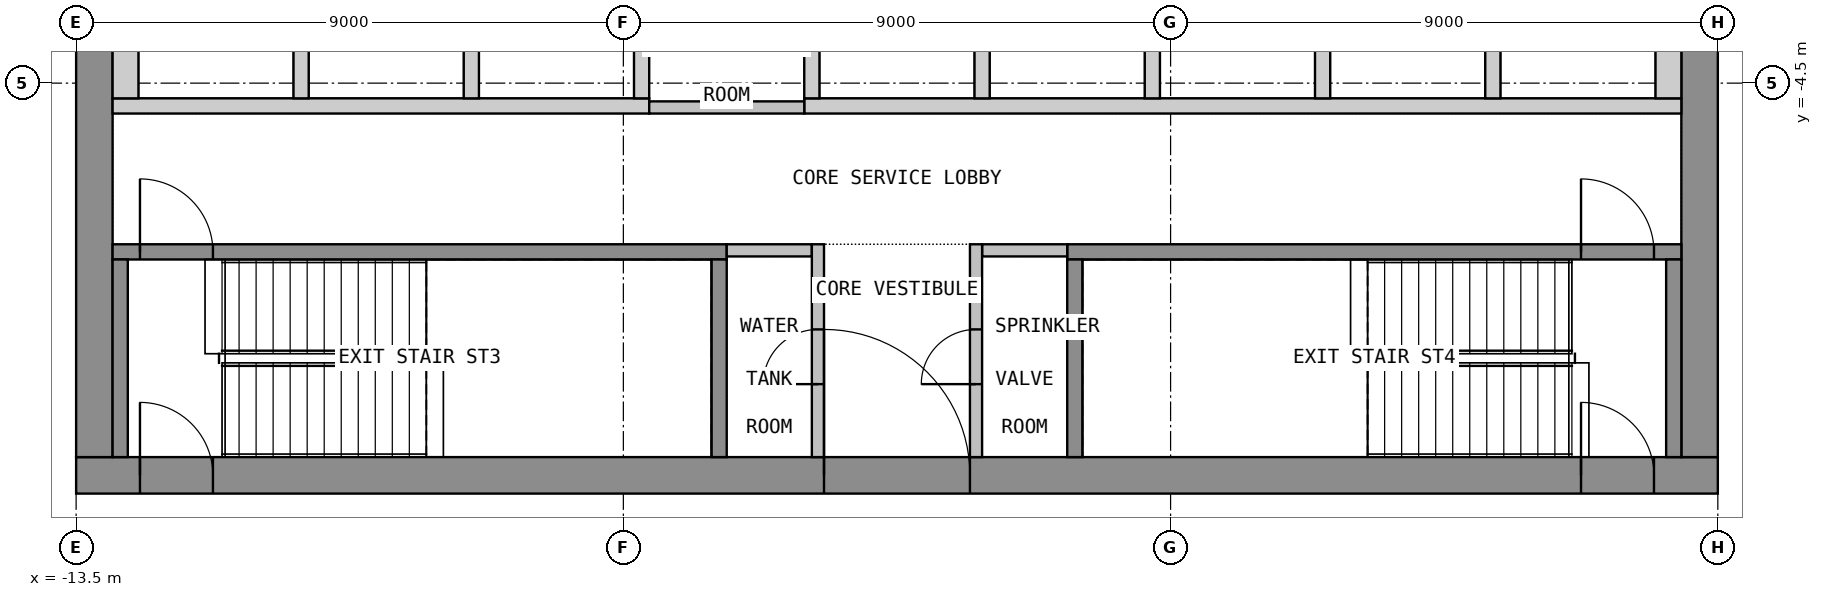
"""IFC4 building model, lengths in metres.
Left out: names, types, materials, properties, quantities, classifications, styles, units other than length and angle.
Written with IfcOpenShell. Run it as: python <this file> out.ifc"""

import sys

from ifc_helpers import new_model, si_unit, direction, frame, frame_2d, origin, place, context, subcontext, project, spatial, polyline, rectangle, outline, extrude, element, fill, save


model = new_model("IFC4")
c1 = context("Model", 3, precision=1e-05, world=origin(), true_north=direction((0.0, 1.0)))
c2 = subcontext(c1, "Body", "Model", "MODEL_VIEW")
j1 = project(units=[si_unit("LENGTHUNIT", "METRE"), si_unit("PLANEANGLEUNIT", "RADIAN")], contexts=[c1])
p1 = place(None, origin())
s1 = spatial("IfcSite", under=j1, at=p1, CompositionType="ELEMENT")
p2 = place(p1, origin())
s2 = spatial("IfcBuilding", under=s1, at=p2, CompositionType="ELEMENT")
p3 = place(p2, frame((0.0, 0.0, 179.4)))
s3 = spatial("IfcBuildingStorey", under=s2, at=p3, CompositionType="ELEMENT", Elevation=179.4)
p4 = place(p3, frame((-13.5, -10.95, 0.0), z_axis=(0.0, 0.0, 1.0), x_axis=(1.0, 0.0, 0.0)))
e1 = element("IfcWall", 1, at=p4, inside=s3, PredefinedType="SHEAR", context=c2, shape_type="SweptSolid", body=[
    extrude(rectangle(XDim=27.0, YDim=0.6, at=frame_2d((13.5, 0.0))), origin(), (0.0, 0.0, 1.0), 4.15),
])
p5 = place(p4, frame((12.3, 0.0, 0.0)))
e2 = element("IfcOpeningElement", 2, at=p5, cuts=e1, PredefinedType="OPENING", context=c2, shape_type="SweptSolid", body=[
    extrude(rectangle(XDim=2.4, YDim=2.1, at=frame_2d((1.2, 1.05))), frame((0.0, 0.31, 0.0), z_axis=(0.0, -1.0, 0.0), x_axis=(1.0, 0.0, 0.0)), (0.0, 0.0, 1.0), 0.62),
])
p6 = place(p4, frame((1.05, 0.0, 0.0)))
e3 = element("IfcOpeningElement", 3, at=p6, cuts=e1, PredefinedType="OPENING", context=c2, shape_type="SweptSolid", body=[
    extrude(rectangle(XDim=1.2, YDim=2.1, at=frame_2d((0.6, 1.05))), frame((0.0, 0.31, 0.0), z_axis=(0.0, -1.0, 0.0), x_axis=(1.0, 0.0, 0.0)), (0.0, 0.0, 1.0), 0.62),
])
p7 = place(p4, frame((24.75, 0.0, 0.0)))
e4 = element("IfcOpeningElement", 4, at=p7, cuts=e1, PredefinedType="OPENING", context=c2, shape_type="SweptSolid", body=[
    extrude(rectangle(XDim=1.2, YDim=2.1, at=frame_2d((0.6, 1.05))), frame((0.0, 0.31, 0.0), z_axis=(0.0, -1.0, 0.0), x_axis=(1.0, 0.0, 0.0)), (0.0, 0.0, 1.0), 0.62),
])
p8 = place(p3, frame((-13.2, -10.65, 0.0), z_axis=(0.0, 0.0, 1.0), x_axis=(0.0, 1.0, 0.0)))
e5 = element("IfcWall", 5, at=p8, inside=s3, PredefinedType="SHEAR", context=c2, shape_type="SweptSolid", body=[
    extrude(rectangle(XDim=21.3, YDim=0.6, at=frame_2d((10.65, 0.0))), origin(), (0.0, 0.0, 1.0), 4.15),
])
p9 = place(p8, frame((9.45, 0.0, 0.0)))
e6 = element("IfcOpeningElement", 6, at=p9, cuts=e5, PredefinedType="OPENING", context=c2, shape_type="SweptSolid", body=[
    extrude(rectangle(XDim=2.4, YDim=2.1, at=frame_2d((1.2, 1.05))), frame((0.0, 0.31, 0.0), z_axis=(0.0, -1.0, 0.0), x_axis=(1.0, 0.0, 0.0)), (0.0, 0.0, 1.0), 0.62),
])
p10 = place(p3, frame((13.2, -10.65, 0.0), z_axis=(0.0, 0.0, 1.0), x_axis=(0.0, 1.0, 0.0)))
e7 = element("IfcWall", 7, at=p10, inside=s3, PredefinedType="SHEAR", context=c2, shape_type="SweptSolid", body=[
    extrude(rectangle(XDim=21.3, YDim=0.6, at=frame_2d((10.65, 0.0))), origin(), (0.0, 0.0, 1.0), 4.15),
])
p11 = place(p10, frame((9.45, 0.0, 0.0)))
e8 = element("IfcOpeningElement", 8, at=p11, cuts=e7, PredefinedType="OPENING", context=c2, shape_type="SweptSolid", body=[
    extrude(rectangle(XDim=2.4, YDim=2.1, at=frame_2d((1.2, 1.05))), frame((0.0, 0.31, 0.0), z_axis=(0.0, -1.0, 0.0), x_axis=(1.0, 0.0, 0.0)), (0.0, 0.0, 1.0), 0.62),
])
p12 = place(p3, origin())
e9 = element("IfcWall", 9, at=p12, inside=s3, PredefinedType="SHEAR", context=c2, shape_type="SweptSolid", body=[
    extrude(outline(polyline([(-12.9, -5.0), (-4.075, -5.0), (-4.075, -4.75), (-12.9, -4.75), (-12.9, -5.0)])), origin(), (0.0, 0.0, 1.0), 4.15),
])
p13 = place(p3, origin())
e10 = element("IfcWall", 10, at=p13, inside=s3, PredefinedType="SHEAR", context=c2, shape_type="SweptSolid", body=[
    extrude(outline(polyline([(-1.525, -5.0), (12.9, -5.0), (12.9, -4.75), (-1.525, -4.75), (-1.525, -5.0)])), origin(), (0.0, 0.0, 1.0), 4.15),
])
p14 = place(p3, origin())
e11 = element("IfcWall", 11, at=p14, inside=s3, PredefinedType="SHEAR", context=c2, shape_type="SweptSolid", body=[
    extrude(outline(polyline([(-12.9, -4.75), (-12.475, -4.75), (-12.475, -3.05), (-12.9, -3.05), (-12.9, -4.75)])), origin(), (0.0, 0.0, 1.0), 4.15),
])
p15 = place(p3, origin())
e12 = element("IfcWall", 12, at=p15, inside=s3, PredefinedType="SHEAR", context=c2, shape_type="SweptSolid", body=[
    extrude(outline(polyline([(-9.925, -4.75), (-9.675, -4.75), (-9.675, -3.05), (-9.925, -3.05), (-9.925, -4.75)])), origin(), (0.0, 0.0, 1.0), 4.15),
])
p16 = place(p3, origin())
e13 = element("IfcWall", 13, at=p16, inside=s3, PredefinedType="SHEAR", context=c2, shape_type="SweptSolid", body=[
    extrude(outline(polyline([(-7.125, -4.75), (-6.875, -4.75), (-6.875, -3.05), (-7.125, -3.05), (-7.125, -4.75)])), origin(), (0.0, 0.0, 1.0), 4.15),
])
p17 = place(p3, origin())
e14 = element("IfcWall", 14, at=p17, inside=s3, PredefinedType="SHEAR", context=c2, shape_type="SweptSolid", body=[
    extrude(outline(polyline([(-4.325, -4.75), (-4.075, -4.75), (-4.075, -3.05), (-4.325, -3.05), (-4.325, -4.75)])), origin(), (0.0, 0.0, 1.0), 4.15),
])
p18 = place(p3, origin())
e15 = element("IfcWall", 15, at=p18, inside=s3, PredefinedType="SHEAR", context=c2, shape_type="SweptSolid", body=[
    extrude(outline(polyline([(-1.525, -4.75), (-1.275, -4.75), (-1.275, -2.05), (-1.525, -2.05), (-1.525, -4.75)])), origin(), (0.0, 0.0, 1.0), 4.15),
])
p19 = place(p3, origin())
e16 = element("IfcWall", 16, at=p19, inside=s3, PredefinedType="SHEAR", context=c2, shape_type="SweptSolid", body=[
    extrude(outline(polyline([(1.275, -4.75), (1.525, -4.75), (1.525, -2.05), (1.275, -2.05), (1.275, -4.75)])), origin(), (0.0, 0.0, 1.0), 4.15),
])
p20 = place(p3, origin())
e17 = element("IfcWall", 17, at=p20, inside=s3, PredefinedType="SHEAR", context=c2, shape_type="SweptSolid", body=[
    extrude(outline(polyline([(4.075, -4.75), (4.325, -4.75), (4.325, -2.05), (4.075, -2.05), (4.075, -4.75)])), origin(), (0.0, 0.0, 1.0), 4.15),
])
p21 = place(p3, origin())
e18 = element("IfcWall", 18, at=p21, inside=s3, PredefinedType="SHEAR", context=c2, shape_type="SweptSolid", body=[
    extrude(outline(polyline([(6.875, -4.75), (7.125, -4.75), (7.125, -2.05), (6.875, -2.05), (6.875, -4.75)])), origin(), (0.0, 0.0, 1.0), 4.15),
])
p22 = place(p3, origin())
e19 = element("IfcWall", 19, at=p22, inside=s3, PredefinedType="SHEAR", context=c2, shape_type="SweptSolid", body=[
    extrude(outline(polyline([(9.675, -4.75), (9.925, -4.75), (9.925, -2.05), (9.675, -2.05), (9.675, -4.75)])), origin(), (0.0, 0.0, 1.0), 4.15),
])
p23 = place(p3, origin())
e20 = element("IfcWall", 20, at=p23, inside=s3, PredefinedType="SHEAR", context=c2, shape_type="SweptSolid", body=[
    extrude(outline(polyline([(12.475, -4.75), (12.9, -4.75), (12.9, -2.05), (12.475, -2.05), (12.475, -4.75)])), origin(), (0.0, 0.0, 1.0), 4.15),
])
p24 = place(p3, frame((-12.9, -7.275, 0.0), z_axis=(0.0, 0.0, 1.0), x_axis=(1.0, 0.0, 0.0)))
e21 = element("IfcWall", 21, at=p24, inside=s3, PredefinedType="SHEAR", context=c2, shape_type="SweptSolid", body=[
    extrude(rectangle(XDim=10.1, YDim=0.25, at=frame_2d((5.05, 0.0))), origin(), (0.0, 0.0, 1.0), 4.15),
])
p25 = place(p24, frame((0.45, 0.0, 0.0)))
e22 = element("IfcOpeningElement", 22, at=p25, cuts=e21, PredefinedType="OPENING", context=c2, shape_type="SweptSolid", body=[
    extrude(rectangle(XDim=1.2, YDim=2.1, at=frame_2d((0.6, 1.05))), frame((0.0, 0.135, 0.0), z_axis=(0.0, -1.0, 0.0), x_axis=(1.0, 0.0, 0.0)), (0.0, 0.0, 1.0), 0.27),
])
for number, where, z_axis, x_axis in (
    (23, (-12.775, -10.65, 0.0), (0.0, 0.0, 1.0), (0.0, 1.0, 0.0)),
    (24, (-2.925, -10.65, 0.0), (0.0, 0.0, 1.0), (0.0, 1.0, 0.0)),
):
    element("IfcWall", number, at=place(p3, frame(where, z_axis=z_axis, x_axis=x_axis)), inside=s3, PredefinedType="SHEAR", context=c2, shape_type="SweptSolid", body=[
        extrude(rectangle(XDim=3.25, YDim=0.25, at=frame_2d((1.625, 0.0))), origin(), (0.0, 0.0, 1.0), 4.15),
    ])
p26 = place(p3, frame((2.8, -7.275, 0.0), z_axis=(0.0, 0.0, 1.0), x_axis=(1.0, 0.0, 0.0)))
e25 = element("IfcWall", 25, at=p26, inside=s3, PredefinedType="SHEAR", context=c2, shape_type="SweptSolid", body=[
    extrude(rectangle(XDim=10.1, YDim=0.25, at=frame_2d((5.05, 0.0))), origin(), (0.0, 0.0, 1.0), 4.15),
])
p27 = place(p26, frame((8.45, 0.0, 0.0)))
e26 = element("IfcOpeningElement", 26, at=p27, cuts=e25, PredefinedType="OPENING", context=c2, shape_type="SweptSolid", body=[
    extrude(rectangle(XDim=1.2, YDim=2.1, at=frame_2d((0.6, 1.05))), frame((0.0, 0.135, 0.0), z_axis=(0.0, -1.0, 0.0), x_axis=(1.0, 0.0, 0.0)), (0.0, 0.0, 1.0), 0.27),
])
for number, where, z_axis, x_axis in (
    (27, (2.925, -10.65, 0.0), (0.0, 0.0, 1.0), (0.0, 1.0, 0.0)),
    (28, (12.775, -10.65, 0.0), (0.0, 0.0, 1.0), (0.0, 1.0, 0.0)),
):
    element("IfcWall", number, at=place(p3, frame(where, z_axis=z_axis, x_axis=x_axis)), inside=s3, PredefinedType="SHEAR", context=c2, shape_type="SweptSolid", body=[
        extrude(rectangle(XDim=3.25, YDim=0.25, at=frame_2d((1.625, 0.0))), origin(), (0.0, 0.0, 1.0), 4.15),
    ])
for number, where, z_axis, x_axis in (
    (29, (-2.8, -7.25, 0.0), (0.0, 0.0, 1.0), (1.0, 0.0, 0.0)),
    (30, (1.4, -7.25, 0.0), (0.0, 0.0, 1.0), (1.0, 0.0, 0.0)),
):
    element("IfcWall", number, at=place(p3, frame(where, z_axis=z_axis, x_axis=x_axis)), inside=s3, PredefinedType="PARTITIONING", context=c2, shape_type="SweptSolid", body=[
        extrude(rectangle(XDim=1.4, YDim=0.2, at=frame_2d((0.7, 0.0))), origin(), (0.0, 0.0, 1.0), 4.15),
    ])
p28 = place(p3, frame((-1.3, -10.65, 0.0), z_axis=(0.0, 0.0, 1.0), x_axis=(0.0, 1.0, 0.0)))
e31 = element("IfcWall", 31, at=p28, inside=s3, PredefinedType="PARTITIONING", context=c2, shape_type="SweptSolid", body=[
    extrude(rectangle(XDim=3.5, YDim=0.2, at=frame_2d((1.75, 0.0))), origin(), (0.0, 0.0, 1.0), 4.15),
])
p29 = place(p28, frame((1.2, 0.0, 0.0)))
e32 = element("IfcOpeningElement", 32, at=p29, cuts=e31, PredefinedType="OPENING", context=c2, shape_type="SweptSolid", body=[
    extrude(rectangle(XDim=0.9, YDim=2.1, at=frame_2d((0.45, 1.05))), frame((0.0, 0.11, 0.0), z_axis=(0.0, -1.0, 0.0), x_axis=(1.0, 0.0, 0.0)), (0.0, 0.0, 1.0), 0.22),
])
p30 = place(p3, frame((1.3, -10.65, 0.0), z_axis=(0.0, 0.0, 1.0), x_axis=(0.0, 1.0, 0.0)))
e33 = element("IfcWall", 33, at=p30, inside=s3, PredefinedType="PARTITIONING", context=c2, shape_type="SweptSolid", body=[
    extrude(rectangle(XDim=3.5, YDim=0.2, at=frame_2d((1.75, 0.0))), origin(), (0.0, 0.0, 1.0), 4.15),
])
p31 = place(p30, frame((1.2, 0.0, 0.0)))
e34 = element("IfcOpeningElement", 34, at=p31, cuts=e33, PredefinedType="OPENING", context=c2, shape_type="SweptSolid", body=[
    extrude(rectangle(XDim=0.9, YDim=2.1, at=frame_2d((0.45, 1.05))), frame((0.0, 0.11, 0.0), z_axis=(0.0, -1.0, 0.0), x_axis=(1.0, 0.0, 0.0)), (0.0, 0.0, 1.0), 0.22),
])
p32 = place(p3, frame((-4.075, -4.9, 0.0), z_axis=(0.0, 0.0, 1.0), x_axis=(1.0, 0.0, 0.0)))
e35 = element("IfcWall", 35, at=p32, inside=s3, PredefinedType="PARTITIONING", context=c2, shape_type="SweptSolid", body=[
    extrude(rectangle(XDim=2.55, YDim=0.2, at=frame_2d((1.275, 0.0))), origin(), (0.0, 0.0, 1.0), 4.15),
])
p33 = place(p5, origin())
e36 = element("IfcDoor", 36, at=p33, inside=s3, OperationType="DOUBLE_DOOR_DOUBLE_SWING", PredefinedType="DOOR", context=c2, shape_type="SweptSolid", body=[
    extrude(rectangle(XDim=2.4, YDim=2.1, at=frame_2d((1.2, 1.05))), frame((0.0, 0.025, 0.0), z_axis=(0.0, -1.0, 0.0), x_axis=(1.0, 0.0, 0.0)), (0.0, 0.0, 1.0), 0.05),
])
fill(e2, e36)
p34 = place(p6, origin())
e37 = element("IfcDoor", 37, at=p34, inside=s3, OperationType="SINGLE_SWING_RIGHT", PredefinedType="DOOR", context=c2, shape_type="SweptSolid", body=[
    extrude(rectangle(XDim=1.2, YDim=2.1, at=frame_2d((0.6, 1.05))), frame((0.0, 0.025, 0.0), z_axis=(0.0, -1.0, 0.0), x_axis=(1.0, 0.0, 0.0)), (0.0, 0.0, 1.0), 0.05),
])
fill(e3, e37)
p35 = place(p7, origin())
e38 = element("IfcDoor", 38, at=p35, inside=s3, OperationType="SINGLE_SWING_RIGHT", PredefinedType="DOOR", context=c2, shape_type="SweptSolid", body=[
    extrude(rectangle(XDim=1.2, YDim=2.1, at=frame_2d((0.6, 1.05))), frame((0.0, 0.025, 0.0), z_axis=(0.0, -1.0, 0.0), x_axis=(1.0, 0.0, 0.0)), (0.0, 0.0, 1.0), 0.05),
])
fill(e4, e38)
p36 = place(p25, origin())
e39 = element("IfcDoor", 39, at=p36, inside=s3, OperationType="SINGLE_SWING_LEFT", PredefinedType="DOOR", context=c2, shape_type="SweptSolid", body=[
    extrude(rectangle(XDim=1.2, YDim=2.1, at=frame_2d((0.6, 1.05))), frame((0.0, 0.025, 0.0), z_axis=(0.0, -1.0, 0.0), x_axis=(1.0, 0.0, 0.0)), (0.0, 0.0, 1.0), 0.05),
])
fill(e22, e39)
p37 = place(p27, origin())
e40 = element("IfcDoor", 40, at=p37, inside=s3, OperationType="SINGLE_SWING_LEFT", PredefinedType="DOOR", context=c2, shape_type="SweptSolid", body=[
    extrude(rectangle(XDim=1.2, YDim=2.1, at=frame_2d((0.6, 1.05))), frame((0.0, 0.025, 0.0), z_axis=(0.0, -1.0, 0.0), x_axis=(1.0, 0.0, 0.0)), (0.0, 0.0, 1.0), 0.05),
])
fill(e26, e40)
p38 = place(p29, origin())
e41 = element("IfcDoor", 41, at=p38, inside=s3, OperationType="SINGLE_SWING_LEFT", PredefinedType="DOOR", context=c2, shape_type="SweptSolid", body=[
    extrude(rectangle(XDim=0.9, YDim=2.1, at=frame_2d((0.45, 1.05))), frame((0.0, 0.025, 0.0), z_axis=(0.0, -1.0, 0.0), x_axis=(1.0, 0.0, 0.0)), (0.0, 0.0, 1.0), 0.05),
])
fill(e32, e41)
p39 = place(p31, origin())
e42 = element("IfcDoor", 42, at=p39, inside=s3, OperationType="SINGLE_SWING_LEFT", PredefinedType="DOOR", context=c2, shape_type="SweptSolid", body=[
    extrude(rectangle(XDim=0.9, YDim=2.1, at=frame_2d((0.45, 1.05))), frame((0.0, 0.025, 0.0), z_axis=(0.0, -1.0, 0.0), x_axis=(1.0, 0.0, 0.0)), (0.0, 0.0, 1.0), 0.05),
])
fill(e34, e42)
save(model, sys.argv[1])
